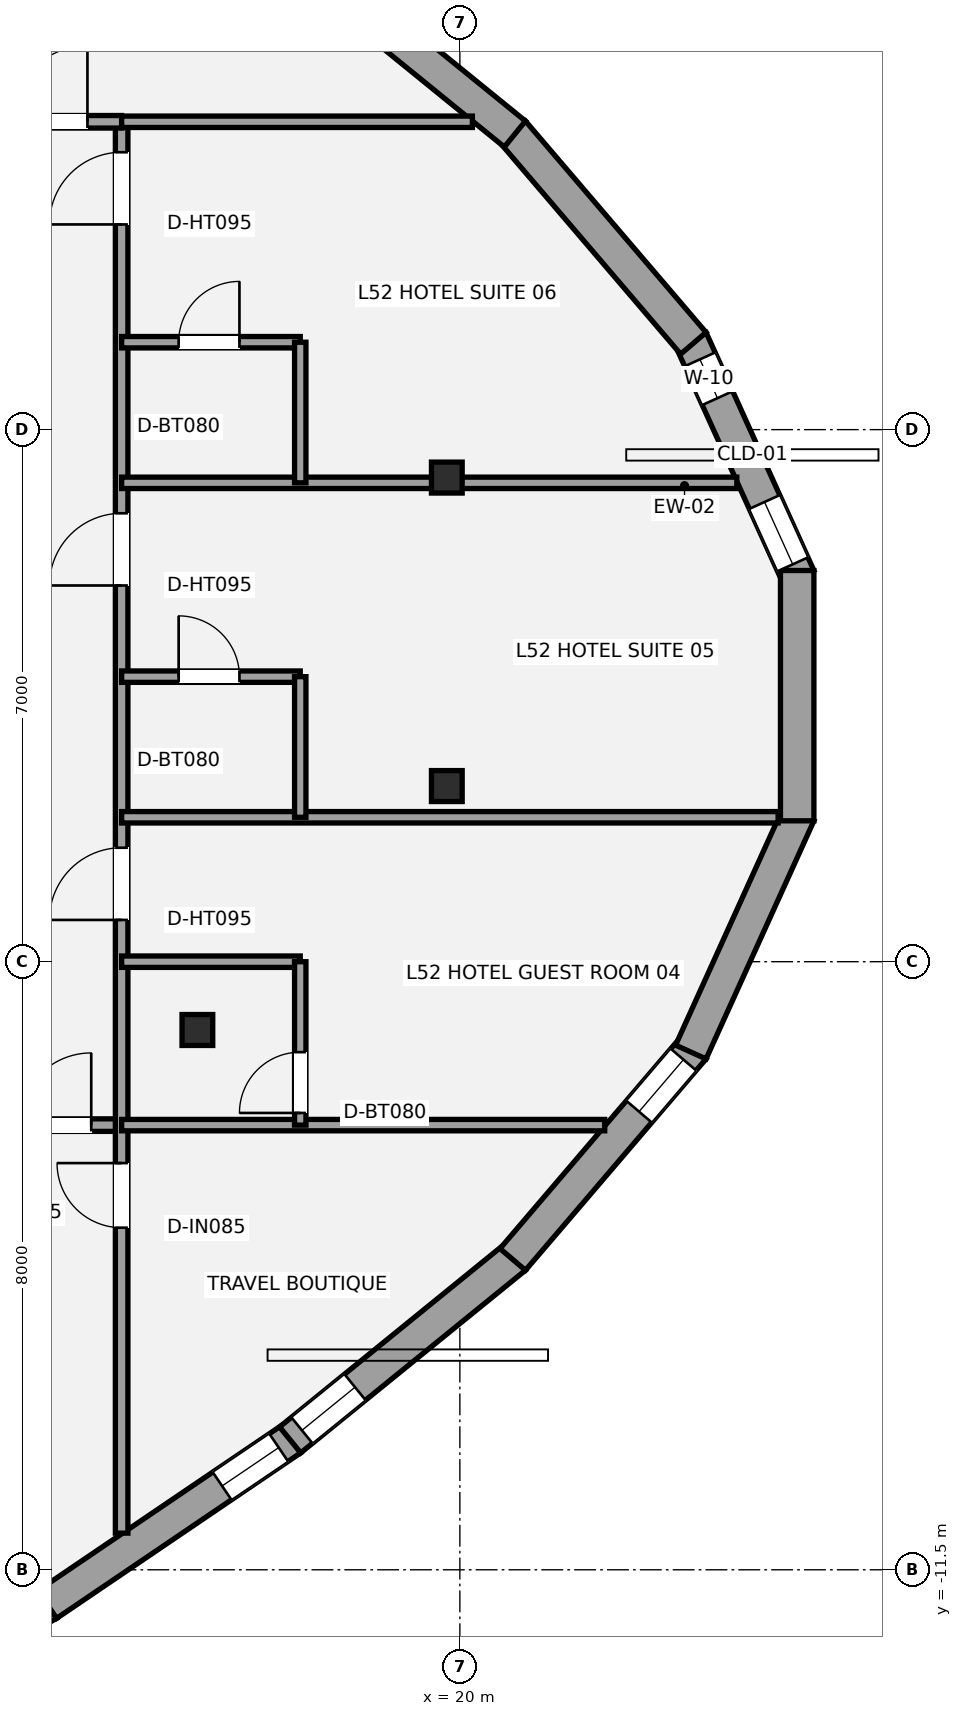
"""IFC4 building model, lengths in metres.
Left out: names, types, materials, properties, quantities, classifications, styles, units other than length and angle.
Written with IfcOpenShell. Run it as: python <this file> out.ifc"""

import sys

from ifc_helpers import new_model, si_unit, direction, frame, frame_2d, origin, origin_2d, place, context, subcontext, project, spatial, rectangle, i_section, extrude, element, fill, save


model = new_model("IFC4")
c1 = context("Model", 3, precision=1e-05, world=origin(), true_north=direction((0.0, 1.0)))
c2 = subcontext(c1, "Body", "Model", "MODEL_VIEW")
j1 = project(units=[si_unit("LENGTHUNIT", "METRE"), si_unit("PLANEANGLEUNIT", "RADIAN")], contexts=[c1])
p1 = place(None, origin())
s1 = spatial("IfcSite", under=j1, at=p1, CompositionType="ELEMENT")
p2 = place(p1, origin())
s2 = spatial("IfcBuilding", under=s1, at=p2, CompositionType="ELEMENT")
p3 = place(p2, frame((0.0, 0.0, 188.6)))
s3 = spatial("IfcBuildingStorey", under=s2, at=p3, CompositionType="ELEMENT", Elevation=188.6)
for number, where, z_axis, x_axis in (
    (1, (19.828, 2.869, 0.0), (0.0, 0.0, 1.0), (1.0, 0.0, 0.0)),
    (2, (16.547, -4.398, 0.0), (0.0, 0.0, 1.0), (1.0, 0.0, 0.0)),
    (3, (19.828, -1.189, 0.0), (0.0, 0.0, 1.0), (1.0, 0.0, 0.0)),
):
    element("IfcColumn", number, at=place(p3, frame(where, z_axis=z_axis, x_axis=x_axis)), inside=s3, PredefinedType="COLUMN", context=c2, shape_type="SweptSolid", body=[
        extrude(i_section(OverallWidth=0.404, OverallDepth=0.407, WebThickness=0.027, FlangeThickness=0.044, at=origin_2d()), origin(), (0.0, 0.0, 1.0), 3.2),
    ])
p4 = place(p3, frame((23.039, 4.688, 0.0), z_axis=(0.0, 0.0, 1.0), x_axis=(0.412583132773, -0.91091995178, 0.0)))
e4 = element("IfcWall", 4, at=p4, inside=s3, PredefinedType="STANDARD", context=c2, shape_type="SweptSolid", body=[
    extrude(rectangle(XDim=3.439, YDim=0.44, at=frame_2d((1.72, 0.0))), origin(), (0.0, 0.0, 1.0), 2.315),
])
p5 = place(p4, frame((2.35, 0.0, 0.34)))
e5 = element("IfcOpeningElement", 5, at=p5, cuts=e4, PredefinedType="OPENING", context=c2, shape_type="SweptSolid", body=[
    extrude(rectangle(XDim=0.9, YDim=1.35, at=frame_2d((0.45, 0.675))), frame((0.0, 0.23, 0.0), z_axis=(0.0, -1.0, 0.0), x_axis=(1.0, 0.0, 0.0)), (0.0, 0.0, 1.0), 0.46),
])
p6 = place(p4, frame((0.29, 0.0, 0.58)))
e6 = element("IfcOpeningElement", 6, at=p6, cuts=e4, PredefinedType="OPENING", context=c2, shape_type="SweptSolid", body=[
    extrude(rectangle(XDim=0.56, YDim=1.15, at=frame_2d((0.28, 0.575))), frame((0.0, 0.23, 0.0), z_axis=(0.0, -1.0, 0.0), x_axis=(1.0, 0.0, 0.0)), (0.0, 0.0, 1.0), 0.46),
])
p7 = place(p3, frame((20.696, 7.417, 0.0), z_axis=(0.0, 0.0, 1.0), x_axis=(0.649641806751, -0.760240437573, 0.0)))
e7 = element("IfcWall", 7, at=p7, inside=s3, PredefinedType="STANDARD", context=c2, shape_type="SweptSolid", body=[
    extrude(rectangle(XDim=3.658, YDim=0.44, at=frame_2d((1.829, 0.0))), origin(), (0.0, 0.0, 1.0), 2.315),
])
p8 = place(p3, frame((17.767, 9.792, 0.0), z_axis=(0.0, 0.0, 1.0), x_axis=(0.776145361002, -0.63055402512, 0.0)))
e8 = element("IfcWall", 8, at=p8, inside=s3, PredefinedType="STANDARD", context=c2, shape_type="SweptSolid", body=[
    extrude(rectangle(XDim=3.81, YDim=0.44, at=frame_2d((1.905, 0.0))), origin(), (0.0, 0.0, 1.0), 2.315),
])
p9 = place(p3, frame((14.587, -11.948, 0.0), z_axis=(0.0, 0.0, 1.0), x_axis=(-0.870346086449, -0.492440544434, 0.0)))
e9 = element("IfcWall", 9, at=p9, inside=s3, PredefinedType="STANDARD", context=c2, shape_type="SweptSolid", body=[
    extrude(rectangle(XDim=4.071, YDim=0.44, at=frame_2d((2.036, 0.0))), origin(), (0.0, 0.0, 1.0), 2.315),
])
p10 = place(p9, frame((2.922, 0.0, 0.58)))
e10 = element("IfcOpeningElement", 10, at=p10, cuts=e9, PredefinedType="OPENING", context=c2, shape_type="SweptSolid", body=[
    extrude(rectangle(XDim=0.9, YDim=1.35, at=frame_2d((0.45, 0.675))), frame((0.0, 0.23, 0.0), z_axis=(0.0, -1.0, 0.0), x_axis=(1.0, 0.0, 0.0)), (0.0, 0.0, 1.0), 0.46),
])
p11 = place(p3, frame((17.782, -9.78, 0.0), z_axis=(0.0, 0.0, 1.0), x_axis=(-0.82772633423, -0.56113199483, 0.0)))
e11 = element("IfcWall", 11, at=p11, inside=s3, PredefinedType="STANDARD", context=c2, shape_type="SweptSolid", body=[
    extrude(rectangle(XDim=3.879, YDim=0.44, at=frame_2d((1.939, 0.0))), origin(), (0.0, 0.0, 1.0), 2.315),
])
p12 = place(p11, frame((0.2, 0.0, 0.58)))
e12 = element("IfcOpeningElement", 12, at=p12, cuts=e11, PredefinedType="OPENING", context=c2, shape_type="SweptSolid", body=[
    extrude(rectangle(XDim=0.9, YDim=1.35, at=frame_2d((0.45, 0.675))), frame((0.0, 0.23, 0.0), z_axis=(0.0, -1.0, 0.0), x_axis=(1.0, 0.0, 0.0)), (0.0, 0.0, 1.0), 0.46),
])
p13 = place(p3, frame((20.724, -7.389, 0.0), z_axis=(0.0, 0.0, 1.0), x_axis=(-0.776145361002, -0.63055402512, 0.0)))
e13 = element("IfcWall", 13, at=p13, inside=s3, PredefinedType="STANDARD", context=c2, shape_type="SweptSolid", body=[
    extrude(rectangle(XDim=3.81, YDim=0.44, at=frame_2d((1.905, 0.0))), origin(), (0.0, 0.0, 1.0), 2.315),
])
p14 = place(p13, frame((2.71, 0.0, 0.42)))
e14 = element("IfcOpeningElement", 14, at=p14, cuts=e13, PredefinedType="OPENING", context=c2, shape_type="SweptSolid", body=[
    extrude(rectangle(XDim=0.9, YDim=1.35, at=frame_2d((0.45, 0.675))), frame((0.0, 0.23, 0.0), z_axis=(0.0, -1.0, 0.0), x_axis=(1.0, 0.0, 0.0)), (0.0, 0.0, 1.0), 0.46),
])
p15 = place(p3, frame((23.072, -4.636, 0.0), z_axis=(0.0, 0.0, 1.0), x_axis=(-0.649641806751, -0.760240437573, 0.0)))
e15 = element("IfcWall", 15, at=p15, inside=s3, PredefinedType="STANDARD", context=c2, shape_type="SweptSolid", body=[
    extrude(rectangle(XDim=3.658, YDim=0.44, at=frame_2d((1.829, 0.0))), origin(), (0.0, 0.0, 1.0), 2.315),
])
p16 = place(p15, frame((0.2, 0.0, 0.42)))
e16 = element("IfcOpeningElement", 16, at=p16, cuts=e15, PredefinedType="OPENING", context=c2, shape_type="SweptSolid", body=[
    extrude(rectangle(XDim=0.9, YDim=1.35, at=frame_2d((0.45, 0.675))), frame((0.0, 0.23, 0.0), z_axis=(0.0, -1.0, 0.0), x_axis=(1.0, 0.0, 0.0)), (0.0, 0.0, 1.0), 0.46),
])
p17 = place(p3, frame((24.458, -1.556, 0.0), z_axis=(0.0, 0.0, 1.0), x_axis=(-0.412583132773, -0.91091995178, 0.0)))
e17 = element("IfcWall", 17, at=p17, inside=s3, PredefinedType="STANDARD", context=c2, shape_type="SweptSolid", body=[
    extrude(rectangle(XDim=3.439, YDim=0.44, at=frame_2d((1.72, 0.0))), origin(), (0.0, 0.0, 1.0), 2.315),
])
p18 = place(p3, frame((24.438, 1.646, 0.0), z_axis=(0.0, 0.0, 1.0), x_axis=(0.0, -1.0, 0.0)))
e18 = element("IfcWall", 18, at=p18, inside=s3, PredefinedType="STANDARD", context=c2, shape_type="SweptSolid", body=[
    extrude(rectangle(XDim=3.293, YDim=0.44, at=frame_2d((1.646, 0.0))), origin(), (0.0, 0.0, 1.0), 2.315),
])
p19 = place(p3, frame((-16.1, -5.65, 0.0), z_axis=(0.0, 0.0, 1.0), x_axis=(1.0, 0.0, 0.0)))
e19 = element("IfcWall", 19, at=p19, inside=s3, PredefinedType="PARTITIONING", context=c2, shape_type="SweptSolid", body=[
    extrude(rectangle(XDim=31.65, YDim=0.165, at=frame_2d((15.825, 0.0))), origin(), (0.0, 0.0, 1.0), 2.398),
])
p20 = place(p19, frame((8.95, 0.0, 0.0)))
e20 = element("IfcOpeningElement", 20, at=p20, cuts=e19, PredefinedType="OPENING", context=c2, shape_type="SweptSolid", body=[
    extrude(rectangle(XDim=0.95, YDim=2.15, at=frame_2d((0.475, 1.075))), frame((0.0, 0.093, 0.0), z_axis=(0.0, -1.0, 0.0), x_axis=(1.0, 0.0, 0.0)), (0.0, 0.0, 1.0), 0.185),
])
p21 = place(p19, frame((18.95, 0.0, 0.0)))
e21 = element("IfcOpeningElement", 21, at=p21, cuts=e19, PredefinedType="OPENING", context=c2, shape_type="SweptSolid", body=[
    extrude(rectangle(XDim=0.95, YDim=2.15, at=frame_2d((0.475, 1.075))), frame((0.0, 0.093, 0.0), z_axis=(0.0, -1.0, 0.0), x_axis=(1.0, 0.0, 0.0)), (0.0, 0.0, 1.0), 0.185),
])
p22 = place(p19, frame((30.3, 0.0, 0.0)))
e22 = element("IfcOpeningElement", 22, at=p22, cuts=e19, PredefinedType="OPENING", context=c2, shape_type="SweptSolid", body=[
    extrude(rectangle(XDim=0.95, YDim=2.15, at=frame_2d((0.475, 1.075))), frame((0.0, 0.093, 0.0), z_axis=(0.0, -1.0, 0.0), x_axis=(1.0, 0.0, 0.0)), (0.0, 0.0, 1.0), 0.185),
])
p23 = place(p3, frame((15.55, -11.018, 0.0), z_axis=(0.0, 0.0, 1.0), x_axis=(0.0, 1.0, 0.0)))
e23 = element("IfcWall", 23, at=p23, inside=s3, PredefinedType="PARTITIONING", context=c2, shape_type="SweptSolid", body=[
    extrude(rectangle(XDim=18.568, YDim=0.165, at=frame_2d((9.284, 0.0))), origin(), (0.0, 0.0, 1.0), 2.473),
])
p24 = place(p23, frame((4.019, 0.0, 0.0)))
e24 = element("IfcOpeningElement", 24, at=p24, cuts=e23, PredefinedType="OPENING", context=c2, shape_type="SweptSolid", body=[
    extrude(rectangle(XDim=0.85, YDim=2.1, at=frame_2d((0.425, 1.05))), frame((0.0, 0.093, 0.0), z_axis=(0.0, -1.0, 0.0), x_axis=(1.0, 0.0, 0.0)), (0.0, 0.0, 1.0), 0.185),
])
p25 = place(p23, frame((8.067, 0.0, 0.0)))
e25 = element("IfcOpeningElement", 25, at=p25, cuts=e23, PredefinedType="OPENING", context=c2, shape_type="SweptSolid", body=[
    extrude(rectangle(XDim=0.95, YDim=2.15, at=frame_2d((0.475, 1.075))), frame((0.0, 0.093, 0.0), z_axis=(0.0, -1.0, 0.0), x_axis=(1.0, 0.0, 0.0)), (0.0, 0.0, 1.0), 0.185),
])
p26 = place(p23, frame((12.468, 0.0, 0.0)))
e26 = element("IfcOpeningElement", 26, at=p26, cuts=e23, PredefinedType="OPENING", context=c2, shape_type="SweptSolid", body=[
    extrude(rectangle(XDim=0.95, YDim=2.15, at=frame_2d((0.475, 1.075))), frame((0.0, 0.093, 0.0), z_axis=(0.0, -1.0, 0.0), x_axis=(1.0, 0.0, 0.0)), (0.0, 0.0, 1.0), 0.185),
])
p27 = place(p23, frame((17.218, 0.0, 0.0)))
e27 = element("IfcOpeningElement", 27, at=p27, cuts=e23, PredefinedType="OPENING", context=c2, shape_type="SweptSolid", body=[
    extrude(rectangle(XDim=0.95, YDim=2.15, at=frame_2d((0.475, 1.075))), frame((0.0, 0.093, 0.0), z_axis=(0.0, -1.0, 0.0), x_axis=(1.0, 0.0, 0.0)), (0.0, 0.0, 1.0), 0.185),
])
p28 = place(p3, frame((13.8, 7.55, 0.0), z_axis=(0.0, 0.0, 1.0), x_axis=(1.0, 0.0, 0.0)))
e28 = element("IfcWall", 28, at=p28, inside=s3, PredefinedType="PARTITIONING", context=c2, shape_type="SweptSolid", body=[
    extrude(rectangle(XDim=1.75, YDim=0.165, at=frame_2d((0.875, 0.0))), origin(), (0.0, 0.0, 1.0), 3.02),
])
p29 = place(p28, frame((0.3, 0.0, 0.0)))
e29 = element("IfcOpeningElement", 29, at=p29, cuts=e28, PredefinedType="OPENING", context=c2, shape_type="SweptSolid", body=[
    extrude(rectangle(XDim=1.0, YDim=2.15, at=frame_2d((0.5, 1.075))), frame((0.0, 0.093, 0.0), z_axis=(0.0, -1.0, 0.0), x_axis=(1.0, 0.0, 0.0)), (0.0, 0.0, 1.0), 0.185),
])
p30 = place(p3, frame((15.55, 7.55, 0.0), z_axis=(0.0, 0.0, 1.0), x_axis=(1.0, 0.0, 0.0)))
e30 = element("IfcWall", 30, at=p30, inside=s3, PredefinedType="PLUMBINGWALL", context=c2, shape_type="SweptSolid", body=[
    extrude(rectangle(XDim=4.615, YDim=0.15, at=frame_2d((2.307, 0.0))), origin(), (0.0, 0.0, 1.0), 3.02),
])
p31 = place(p3, frame((15.55, -5.65, 0.0), z_axis=(0.0, 0.0, 1.0), x_axis=(1.0, 0.0, 0.0)))
e31 = element("IfcWall", 31, at=p31, inside=s3, PredefinedType="PLUMBINGWALL", context=c2, shape_type="SweptSolid", body=[
    extrude(rectangle(XDim=6.356, YDim=0.15, at=frame_2d((3.178, 0.0))), origin(), (0.0, 0.0, 1.0), 2.473),
])
p32 = place(p3, frame((15.55, -1.6, 0.0), z_axis=(0.0, 0.0, 1.0), x_axis=(1.0, 0.0, 0.0)))
e32 = element("IfcWall", 32, at=p32, inside=s3, PredefinedType="PLUMBINGWALL", context=c2, shape_type="SweptSolid", body=[
    extrude(rectangle(XDim=8.637, YDim=0.15, at=frame_2d((4.319, 0.0))), origin(), (0.0, 0.0, 1.0), 2.398),
])
p33 = place(p3, frame((15.55, 2.8, 0.0), z_axis=(0.0, 0.0, 1.0), x_axis=(1.0, 0.0, 0.0)))
e33 = element("IfcWall", 33, at=p33, inside=s3, PredefinedType="PLUMBINGWALL", context=c2, shape_type="SweptSolid", body=[
    extrude(rectangle(XDim=8.094, YDim=0.15, at=frame_2d((4.047, 0.0))), origin(), (0.0, 0.0, 1.0), 2.473),
])
p34 = place(p3, frame((15.55, -3.5, 0.0), z_axis=(0.0, 0.0, 1.0), x_axis=(1.0, 0.0, 0.0)))
e34 = element("IfcWall", 34, at=p34, inside=s3, PredefinedType="PLUMBINGWALL", context=c2, shape_type="SweptSolid", body=[
    extrude(rectangle(XDim=2.35, YDim=0.15, at=frame_2d((1.175, 0.0))), origin(), (0.0, 0.0, 1.0), 2.398),
])
p35 = place(p3, frame((17.9, -5.65, 0.0), z_axis=(0.0, 0.0, 1.0), x_axis=(0.0, 1.0, 0.0)))
e35 = element("IfcWall", 35, at=p35, inside=s3, PredefinedType="PLUMBINGWALL", context=c2, shape_type="SweptSolid", body=[
    extrude(rectangle(XDim=2.15, YDim=0.15, at=frame_2d((1.075, 0.0))), origin(), (0.0, 0.0, 1.0), 2.473),
])
p36 = place(p35, frame((0.16, 0.0, 0.0)))
e36 = element("IfcOpeningElement", 36, at=p36, cuts=e35, PredefinedType="OPENING", context=c2, shape_type="SweptSolid", body=[
    extrude(rectangle(XDim=0.8, YDim=2.1, at=frame_2d((0.4, 1.05))), frame((0.0, 0.085, 0.0), z_axis=(0.0, -1.0, 0.0), x_axis=(1.0, 0.0, 0.0)), (0.0, 0.0, 1.0), 0.17),
])
p37 = place(p3, frame((15.55, 0.25, 0.0), z_axis=(0.0, 0.0, 1.0), x_axis=(1.0, 0.0, 0.0)))
e37 = element("IfcWall", 37, at=p37, inside=s3, PredefinedType="PLUMBINGWALL", context=c2, shape_type="SweptSolid", body=[
    extrude(rectangle(XDim=2.35, YDim=0.15, at=frame_2d((1.175, 0.0))), origin(), (0.0, 0.0, 1.0), 2.473),
])
p38 = place(p37, frame((0.75, 0.0, 0.0)))
e38 = element("IfcOpeningElement", 38, at=p38, cuts=e37, PredefinedType="OPENING", context=c2, shape_type="SweptSolid", body=[
    extrude(rectangle(XDim=0.8, YDim=2.1, at=frame_2d((0.4, 1.05))), frame((0.0, 0.085, 0.0), z_axis=(0.0, -1.0, 0.0), x_axis=(1.0, 0.0, 0.0)), (0.0, 0.0, 1.0), 0.17),
])
p39 = place(p3, frame((17.9, -1.6, 0.0), z_axis=(0.0, 0.0, 1.0), x_axis=(0.0, 1.0, 0.0)))
e39 = element("IfcWall", 39, at=p39, inside=s3, PredefinedType="PLUMBINGWALL", context=c2, shape_type="SweptSolid", body=[
    extrude(rectangle(XDim=1.85, YDim=0.15, at=frame_2d((0.925, 0.0))), origin(), (0.0, 0.0, 1.0), 3.02),
])
p40 = place(p3, frame((15.55, 4.65, 0.0), z_axis=(0.0, 0.0, 1.0), x_axis=(1.0, 0.0, 0.0)))
e40 = element("IfcWall", 40, at=p40, inside=s3, PredefinedType="PLUMBINGWALL", context=c2, shape_type="SweptSolid", body=[
    extrude(rectangle(XDim=2.35, YDim=0.15, at=frame_2d((1.175, 0.0))), origin(), (0.0, 0.0, 1.0), 3.02),
])
p41 = place(p40, frame((0.75, 0.0, 0.0)))
e41 = element("IfcOpeningElement", 41, at=p41, cuts=e40, PredefinedType="OPENING", context=c2, shape_type="SweptSolid", body=[
    extrude(rectangle(XDim=0.8, YDim=2.1, at=frame_2d((0.4, 1.05))), frame((0.0, 0.085, 0.0), z_axis=(0.0, -1.0, 0.0), x_axis=(1.0, 0.0, 0.0)), (0.0, 0.0, 1.0), 0.17),
])
p42 = place(p3, frame((17.9, 2.8, 0.0), z_axis=(0.0, 0.0, 1.0), x_axis=(0.0, 1.0, 0.0)))
e42 = element("IfcWall", 42, at=p42, inside=s3, PredefinedType="PLUMBINGWALL", context=c2, shape_type="SweptSolid", body=[
    extrude(rectangle(XDim=1.85, YDim=0.15, at=frame_2d((0.925, 0.0))), origin(), (0.0, 0.0, 1.0), 3.02),
])
p43 = place(p12, origin())
e43 = element("IfcWindow", 43, at=p43, inside=s3, PartitioningType="SINGLE_PANEL", PredefinedType="WINDOW", context=c2, shape_type="SweptSolid", body=[
    extrude(rectangle(XDim=0.9, YDim=1.35, at=frame_2d((0.45, 0.675))), frame((0.0, -0.01, 0.0), z_axis=(0.0, -1.0, 0.0), x_axis=(1.0, 0.0, 0.0)), (0.0, 0.0, 1.0), 0.06),
])
fill(e12, e43)
p44 = place(p14, origin())
e44 = element("IfcWindow", 44, at=p44, inside=s3, PartitioningType="SINGLE_PANEL", PredefinedType="WINDOW", context=c2, shape_type="SweptSolid", body=[
    extrude(rectangle(XDim=0.9, YDim=1.35, at=frame_2d((0.45, 0.675))), frame((0.0, -0.01, 0.0), z_axis=(0.0, -1.0, 0.0), x_axis=(1.0, 0.0, 0.0)), (0.0, 0.0, 1.0), 0.06),
])
fill(e14, e44)
p45 = place(p16, origin())
e45 = element("IfcWindow", 45, at=p45, inside=s3, PartitioningType="SINGLE_PANEL", PredefinedType="WINDOW", context=c2, shape_type="SweptSolid", body=[
    extrude(rectangle(XDim=0.9, YDim=1.35, at=frame_2d((0.45, 0.675))), frame((0.0, -0.01, 0.0), z_axis=(0.0, -1.0, 0.0), x_axis=(1.0, 0.0, 0.0)), (0.0, 0.0, 1.0), 0.06),
])
fill(e16, e45)
p46 = place(p5, origin())
e46 = element("IfcWindow", 46, at=p46, inside=s3, PartitioningType="SINGLE_PANEL", PredefinedType="WINDOW", context=c2, shape_type="SweptSolid", body=[
    extrude(rectangle(XDim=0.9, YDim=1.35, at=frame_2d((0.45, 0.675))), frame((0.0, -0.01, 0.0), z_axis=(0.0, -1.0, 0.0), x_axis=(1.0, 0.0, 0.0)), (0.0, 0.0, 1.0), 0.06),
])
fill(e5, e46)
p47 = place(p6, origin())
e47 = element("IfcWindow", 47, at=p47, inside=s3, PartitioningType="SINGLE_PANEL", PredefinedType="WINDOW", context=c2, shape_type="SweptSolid", body=[
    extrude(rectangle(XDim=0.56, YDim=1.15, at=frame_2d((0.28, 0.575))), frame((0.0, -0.01, 0.0), z_axis=(0.0, -1.0, 0.0), x_axis=(1.0, 0.0, 0.0)), (0.0, 0.0, 1.0), 0.06),
])
fill(e6, e47)
p48 = place(p29, origin())
e48 = element("IfcDoor", 48, at=p48, inside=s3, OperationType="SINGLE_SWING_RIGHT", PredefinedType="DOOR", context=c2, shape_type="SweptSolid", body=[
    extrude(rectangle(XDim=1.0, YDim=2.15, at=frame_2d((0.5, 1.075))), frame((0.0, 0.025, 0.0), z_axis=(0.0, -1.0, 0.0), x_axis=(1.0, 0.0, 0.0)), (0.0, 0.0, 1.0), 0.05),
])
fill(e29, e48)
p49 = place(p24, origin())
e49 = element("IfcDoor", 49, at=p49, inside=s3, OperationType="SINGLE_SWING_RIGHT", PredefinedType="DOOR", context=c2, shape_type="SweptSolid", body=[
    extrude(rectangle(XDim=0.85, YDim=2.1, at=frame_2d((0.425, 1.05))), frame((0.0, 0.025, 0.0), z_axis=(0.0, -1.0, 0.0), x_axis=(1.0, 0.0, 0.0)), (0.0, 0.0, 1.0), 0.05),
])
fill(e24, e49)
p50 = place(p22, origin())
e50 = element("IfcDoor", 50, at=p50, inside=s3, OperationType="SINGLE_SWING_RIGHT", PredefinedType="DOOR", context=c2, shape_type="SweptSolid", body=[
    extrude(rectangle(XDim=0.95, YDim=2.15, at=frame_2d((0.475, 1.075))), frame((0.0, 0.025, 0.0), z_axis=(0.0, -1.0, 0.0), x_axis=(1.0, 0.0, 0.0)), (0.0, 0.0, 1.0), 0.05),
])
fill(e22, e50)
p51 = place(p25, origin())
e51 = element("IfcDoor", 51, at=p51, inside=s3, OperationType="SINGLE_SWING_LEFT", PredefinedType="DOOR", context=c2, shape_type="SweptSolid", body=[
    extrude(rectangle(XDim=0.95, YDim=2.15, at=frame_2d((0.475, 1.075))), frame((0.0, 0.025, 0.0), z_axis=(0.0, -1.0, 0.0), x_axis=(1.0, 0.0, 0.0)), (0.0, 0.0, 1.0), 0.05),
])
fill(e25, e51)
p52 = place(p36, origin())
e52 = element("IfcDoor", 52, at=p52, inside=s3, OperationType="SINGLE_SWING_LEFT", PredefinedType="DOOR", context=c2, shape_type="SweptSolid", body=[
    extrude(rectangle(XDim=0.8, YDim=2.1, at=frame_2d((0.4, 1.05))), frame((0.0, 0.025, 0.0), z_axis=(0.0, -1.0, 0.0), x_axis=(1.0, 0.0, 0.0)), (0.0, 0.0, 1.0), 0.05),
])
fill(e36, e52)
p53 = place(p26, origin())
e53 = element("IfcDoor", 53, at=p53, inside=s3, OperationType="SINGLE_SWING_LEFT", PredefinedType="DOOR", context=c2, shape_type="SweptSolid", body=[
    extrude(rectangle(XDim=0.95, YDim=2.15, at=frame_2d((0.475, 1.075))), frame((0.0, 0.025, 0.0), z_axis=(0.0, -1.0, 0.0), x_axis=(1.0, 0.0, 0.0)), (0.0, 0.0, 1.0), 0.05),
])
fill(e26, e53)
p54 = place(p38, origin())
e54 = element("IfcDoor", 54, at=p54, inside=s3, OperationType="SINGLE_SWING_LEFT", PredefinedType="DOOR", context=c2, shape_type="SweptSolid", body=[
    extrude(rectangle(XDim=0.8, YDim=2.1, at=frame_2d((0.4, 1.05))), frame((0.0, 0.025, 0.0), z_axis=(0.0, -1.0, 0.0), x_axis=(1.0, 0.0, 0.0)), (0.0, 0.0, 1.0), 0.05),
])
fill(e38, e54)
p55 = place(p27, origin())
e55 = element("IfcDoor", 55, at=p55, inside=s3, OperationType="SINGLE_SWING_LEFT", PredefinedType="DOOR", context=c2, shape_type="SweptSolid", body=[
    extrude(rectangle(XDim=0.95, YDim=2.15, at=frame_2d((0.475, 1.075))), frame((0.0, 0.025, 0.0), z_axis=(0.0, -1.0, 0.0), x_axis=(1.0, 0.0, 0.0)), (0.0, 0.0, 1.0), 0.05),
])
fill(e27, e55)
p56 = place(p41, origin())
e56 = element("IfcDoor", 56, at=p56, inside=s3, OperationType="SINGLE_SWING_RIGHT", PredefinedType="DOOR", context=c2, shape_type="SweptSolid", body=[
    extrude(rectangle(XDim=0.8, YDim=2.1, at=frame_2d((0.4, 1.05))), frame((0.0, 0.025, 0.0), z_axis=(0.0, -1.0, 0.0), x_axis=(1.0, 0.0, 0.0)), (0.0, 0.0, 1.0), 0.05),
])
fill(e41, e56)
save(model, sys.argv[1])
